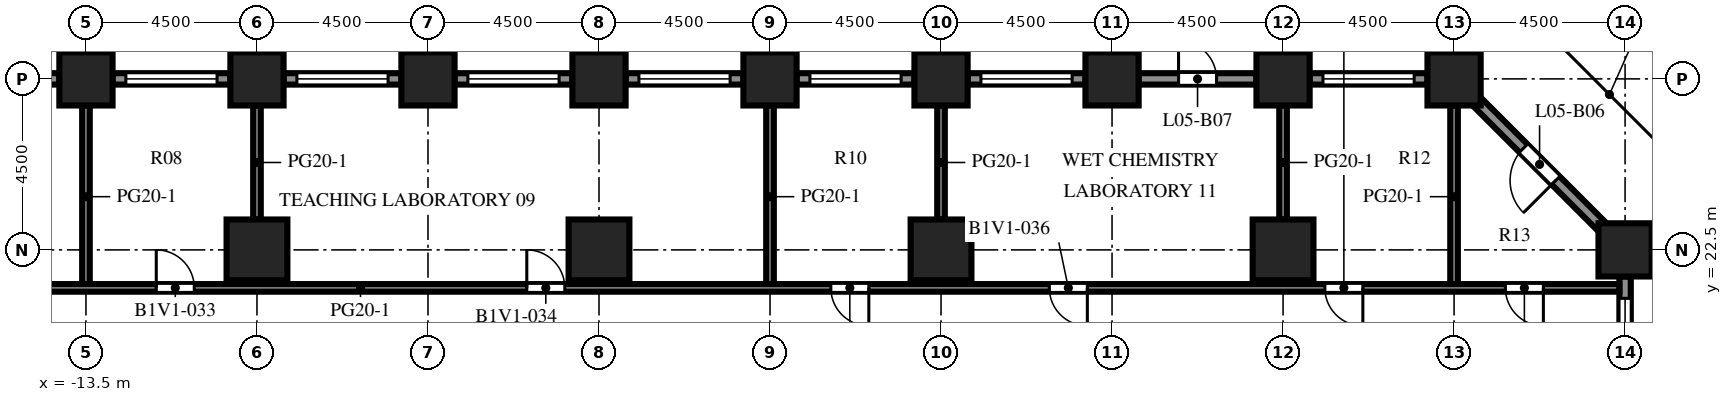
"""IFC4 building model, lengths in metres.
Left out: names, types, materials, properties, quantities, classifications, styles, units other than length and angle.
Written with IfcOpenShell. Run it as: python <this file> out.ifc"""

import sys

from ifc_helpers import new_model, si_unit, direction, frame, frame_2d, origin, origin_2d, place, context, subcontext, project, spatial, rectangle, extrude, element, fill, save


model = new_model("IFC4")
c1 = context("Model", 3, precision=1e-05, world=origin(), true_north=direction((0.0, 1.0)))
c2 = subcontext(c1, "Body", "Model", "MODEL_VIEW")
j1 = project(units=[si_unit("LENGTHUNIT", "METRE"), si_unit("PLANEANGLEUNIT", "RADIAN")], contexts=[c1])
p1 = place(None, origin())
s1 = spatial("IfcSite", under=j1, at=p1, CompositionType="ELEMENT")
p2 = place(p1, origin())
s2 = spatial("IfcBuilding", under=s1, at=p2, CompositionType="ELEMENT")
p3 = place(p2, frame((0.0, 0.0, 23.6)))
s3 = spatial("IfcBuildingStorey", under=s2, at=p3, CompositionType="ELEMENT", Elevation=23.6)
for number, where, z_axis, x_axis in (
    (1, (-13.5, 27.0, 0.0), (0.0, 0.0, 1.0), (1.0, 0.0, 0.0)),
    (2, (-9.0, 27.0, 0.0), (0.0, 0.0, 1.0), (1.0, 0.0, 0.0)),
    (3, (-4.5, 27.0, 0.0), (0.0, 0.0, 1.0), (1.0, 0.0, 0.0)),
    (4, (0.0, 27.0, 0.0), (0.0, 0.0, 1.0), (1.0, 0.0, 0.0)),
    (5, (4.5, 27.0, 0.0), (0.0, 0.0, 1.0), (1.0, 0.0, 0.0)),
    (6, (9.0, 27.0, 0.0), (0.0, 0.0, 1.0), (1.0, 0.0, 0.0)),
    (7, (13.5, 27.0, 0.0), (0.0, 0.0, 1.0), (1.0, 0.0, 0.0)),
    (8, (18.0, 27.0, 0.0), (0.0, 0.0, 1.0), (1.0, 0.0, 0.0)),
    (9, (22.5, 27.0, 0.0), (0.0, 0.0, 1.0), (1.0, 0.0, 0.0)),
    (10, (27.0, 22.5, 0.0), (0.0, 0.0, 1.0), (1.0, 0.0, 0.0)),
):
    element("IfcColumn", number, at=place(p3, frame(where, z_axis=z_axis, x_axis=x_axis)), inside=s3, PredefinedType="COLUMN", context=c2, shape_type="SweptSolid", body=[
        extrude(rectangle(XDim=1.4, YDim=1.4, at=origin_2d()), origin(), (0.0, 0.0, 1.0), 4.1),
    ])
for number, where, z_axis, x_axis in (
    (11, (-9.0, 22.5, 0.0), (0.0, 0.0, 1.0), (1.0, 0.0, 0.0)),
    (12, (0.0, 22.5, 0.0), (0.0, 0.0, 1.0), (1.0, 0.0, 0.0)),
    (13, (9.0, 22.5, 0.0), (0.0, 0.0, 1.0), (1.0, 0.0, 0.0)),
    (14, (18.0, 22.5, 0.0), (0.0, 0.0, 1.0), (1.0, 0.0, 0.0)),
):
    element("IfcColumn", number, at=place(p3, frame(where, z_axis=z_axis, x_axis=x_axis)), inside=s3, PredefinedType="COLUMN", context=c2, shape_type="SweptSolid", body=[
        extrude(rectangle(XDim=1.6, YDim=1.6, at=origin_2d()), origin(), (0.0, 0.0, 1.0), 4.1),
    ])
p4 = place(p3, frame((27.0, 21.8, 0.0), z_axis=(0.0, 0.0, 1.0), x_axis=(0.0, -1.0, 0.0)))
e15 = element("IfcWall", 15, at=p4, inside=s3, PredefinedType="SOLIDWALL", context=c2, shape_type="SweptSolid", body=[
    extrude(rectangle(XDim=3.1, YDim=0.3, at=frame_2d((1.55, 0.0))), origin(), (0.0, 0.0, 1.0), 2.75),
])
p5 = place(p4, frame((0.575, 0.0, 0.8)))
e16 = element("IfcOpeningElement", 16, at=p5, cuts=e15, PredefinedType="OPENING", context=c2, shape_type="SweptSolid", body=[
    extrude(rectangle(XDim=2.4, YDim=1.7, at=frame_2d((1.2, 0.85))), frame((0.0, 0.16, 0.0), z_axis=(0.0, -1.0, 0.0), x_axis=(1.0, 0.0, 0.0)), (0.0, 0.0, 1.0), 0.32),
])
p6 = place(p3, frame((23.094, 26.406, 0.0), z_axis=(0.0, 0.0, 1.0), x_axis=(0.707106781187, -0.707106781187, 0.0)))
e17 = element("IfcWall", 17, at=p6, inside=s3, PredefinedType="SOLIDWALL", context=c2, shape_type="SweptSolid", body=[
    extrude(rectangle(XDim=4.684, YDim=0.3, at=frame_2d((2.342, 0.0))), origin(), (0.0, 0.0, 1.0), 2.75),
])
p7 = place(p6, frame((1.742, 0.0, 0.0)))
e18 = element("IfcOpeningElement", 18, at=p7, cuts=e17, PredefinedType="OPENING", context=c2, shape_type="SweptSolid", body=[
    extrude(rectangle(XDim=1.2, YDim=2.2, at=frame_2d((0.6, 1.1))), frame((0.0, 0.16, 0.0), z_axis=(0.0, -1.0, 0.0), x_axis=(1.0, 0.0, 0.0)), (0.0, 0.0, 1.0), 0.32),
])
p8 = place(p3, frame((18.7, 27.0, 0.0), z_axis=(0.0, 0.0, 1.0), x_axis=(1.0, 0.0, 0.0)))
e19 = element("IfcWall", 19, at=p8, inside=s3, PredefinedType="SOLIDWALL", context=c2, shape_type="SweptSolid", body=[
    extrude(rectangle(XDim=3.1, YDim=0.3, at=frame_2d((1.55, 0.0))), origin(), (0.0, 0.0, 1.0), 2.75),
])
p9 = place(p8, frame((0.35, 0.0, 0.8)))
e20 = element("IfcOpeningElement", 20, at=p9, cuts=e19, PredefinedType="OPENING", context=c2, shape_type="SweptSolid", body=[
    extrude(rectangle(XDim=2.4, YDim=1.7, at=frame_2d((1.2, 0.85))), frame((0.0, 0.16, 0.0), z_axis=(0.0, -1.0, 0.0), x_axis=(1.0, 0.0, 0.0)), (0.0, 0.0, 1.0), 0.32),
])
p10 = place(p3, frame((14.2, 27.0, 0.0), z_axis=(0.0, 0.0, 1.0), x_axis=(1.0, 0.0, 0.0)))
e21 = element("IfcWall", 21, at=p10, inside=s3, PredefinedType="SOLIDWALL", context=c2, shape_type="SweptSolid", body=[
    extrude(rectangle(XDim=3.1, YDim=0.3, at=frame_2d((1.55, 0.0))), origin(), (0.0, 0.0, 1.0), 2.75),
])
p11 = place(p10, frame((1.05, 0.0, 0.0)))
e22 = element("IfcOpeningElement", 22, at=p11, cuts=e21, PredefinedType="OPENING", context=c2, shape_type="SweptSolid", body=[
    extrude(rectangle(XDim=1.0, YDim=2.2, at=frame_2d((0.5, 1.1))), frame((0.0, 0.16, 0.0), z_axis=(0.0, -1.0, 0.0), x_axis=(1.0, 0.0, 0.0)), (0.0, 0.0, 1.0), 0.32),
])
p12 = place(p3, frame((9.7, 27.0, 0.0), z_axis=(0.0, 0.0, 1.0), x_axis=(1.0, 0.0, 0.0)))
e23 = element("IfcWall", 23, at=p12, inside=s3, PredefinedType="SOLIDWALL", context=c2, shape_type="SweptSolid", body=[
    extrude(rectangle(XDim=3.1, YDim=0.3, at=frame_2d((1.55, 0.0))), origin(), (0.0, 0.0, 1.0), 2.75),
])
p13 = place(p12, frame((0.35, 0.0, 0.8)))
e24 = element("IfcOpeningElement", 24, at=p13, cuts=e23, PredefinedType="OPENING", context=c2, shape_type="SweptSolid", body=[
    extrude(rectangle(XDim=2.4, YDim=1.7, at=frame_2d((1.2, 0.85))), frame((0.0, 0.16, 0.0), z_axis=(0.0, -1.0, 0.0), x_axis=(1.0, 0.0, 0.0)), (0.0, 0.0, 1.0), 0.32),
])
p14 = place(p3, frame((5.2, 27.0, 0.0), z_axis=(0.0, 0.0, 1.0), x_axis=(1.0, 0.0, 0.0)))
e25 = element("IfcWall", 25, at=p14, inside=s3, PredefinedType="SOLIDWALL", context=c2, shape_type="SweptSolid", body=[
    extrude(rectangle(XDim=3.1, YDim=0.3, at=frame_2d((1.55, 0.0))), origin(), (0.0, 0.0, 1.0), 2.75),
])
p15 = place(p14, frame((0.35, 0.0, 0.8)))
e26 = element("IfcOpeningElement", 26, at=p15, cuts=e25, PredefinedType="OPENING", context=c2, shape_type="SweptSolid", body=[
    extrude(rectangle(XDim=2.4, YDim=1.7, at=frame_2d((1.2, 0.85))), frame((0.0, 0.16, 0.0), z_axis=(0.0, -1.0, 0.0), x_axis=(1.0, 0.0, 0.0)), (0.0, 0.0, 1.0), 0.32),
])
p16 = place(p3, frame((0.7, 27.0, 0.0), z_axis=(0.0, 0.0, 1.0), x_axis=(1.0, 0.0, 0.0)))
e27 = element("IfcWall", 27, at=p16, inside=s3, PredefinedType="SOLIDWALL", context=c2, shape_type="SweptSolid", body=[
    extrude(rectangle(XDim=3.1, YDim=0.3, at=frame_2d((1.55, 0.0))), origin(), (0.0, 0.0, 1.0), 2.75),
])
p17 = place(p16, frame((0.35, 0.0, 0.8)))
e28 = element("IfcOpeningElement", 28, at=p17, cuts=e27, PredefinedType="OPENING", context=c2, shape_type="SweptSolid", body=[
    extrude(rectangle(XDim=2.4, YDim=1.7, at=frame_2d((1.2, 0.85))), frame((0.0, 0.16, 0.0), z_axis=(0.0, -1.0, 0.0), x_axis=(1.0, 0.0, 0.0)), (0.0, 0.0, 1.0), 0.32),
])
p18 = place(p3, frame((-3.8, 27.0, 0.0), z_axis=(0.0, 0.0, 1.0), x_axis=(1.0, 0.0, 0.0)))
e29 = element("IfcWall", 29, at=p18, inside=s3, PredefinedType="SOLIDWALL", context=c2, shape_type="SweptSolid", body=[
    extrude(rectangle(XDim=3.1, YDim=0.3, at=frame_2d((1.55, 0.0))), origin(), (0.0, 0.0, 1.0), 2.75),
])
p19 = place(p18, frame((0.35, 0.0, 0.8)))
e30 = element("IfcOpeningElement", 30, at=p19, cuts=e29, PredefinedType="OPENING", context=c2, shape_type="SweptSolid", body=[
    extrude(rectangle(XDim=2.4, YDim=1.7, at=frame_2d((1.2, 0.85))), frame((0.0, 0.16, 0.0), z_axis=(0.0, -1.0, 0.0), x_axis=(1.0, 0.0, 0.0)), (0.0, 0.0, 1.0), 0.32),
])
p20 = place(p3, frame((-8.3, 27.0, 0.0), z_axis=(0.0, 0.0, 1.0), x_axis=(1.0, 0.0, 0.0)))
e31 = element("IfcWall", 31, at=p20, inside=s3, PredefinedType="SOLIDWALL", context=c2, shape_type="SweptSolid", body=[
    extrude(rectangle(XDim=3.1, YDim=0.3, at=frame_2d((1.55, 0.0))), origin(), (0.0, 0.0, 1.0), 2.75),
])
p21 = place(p20, frame((0.35, 0.0, 0.8)))
e32 = element("IfcOpeningElement", 32, at=p21, cuts=e31, PredefinedType="OPENING", context=c2, shape_type="SweptSolid", body=[
    extrude(rectangle(XDim=2.4, YDim=1.7, at=frame_2d((1.2, 0.85))), frame((0.0, 0.16, 0.0), z_axis=(0.0, -1.0, 0.0), x_axis=(1.0, 0.0, 0.0)), (0.0, 0.0, 1.0), 0.32),
])
p22 = place(p3, frame((-12.8, 27.0, 0.0), z_axis=(0.0, 0.0, 1.0), x_axis=(1.0, 0.0, 0.0)))
e33 = element("IfcWall", 33, at=p22, inside=s3, PredefinedType="SOLIDWALL", context=c2, shape_type="SweptSolid", body=[
    extrude(rectangle(XDim=3.1, YDim=0.3, at=frame_2d((1.55, 0.0))), origin(), (0.0, 0.0, 1.0), 2.75),
])
p23 = place(p22, frame((0.35, 0.0, 0.8)))
e34 = element("IfcOpeningElement", 34, at=p23, cuts=e33, PredefinedType="OPENING", context=c2, shape_type="SweptSolid", body=[
    extrude(rectangle(XDim=2.4, YDim=1.7, at=frame_2d((1.2, 0.85))), frame((0.0, 0.16, 0.0), z_axis=(0.0, -1.0, 0.0), x_axis=(1.0, 0.0, 0.0)), (0.0, 0.0, 1.0), 0.32),
])
p24 = place(p3, frame((-17.3, 27.0, 0.0), z_axis=(0.0, 0.0, 1.0), x_axis=(1.0, 0.0, 0.0)))
e35 = element("IfcWall", 35, at=p24, inside=s3, PredefinedType="SOLIDWALL", context=c2, shape_type="SweptSolid", body=[
    extrude(rectangle(XDim=3.1, YDim=0.3, at=frame_2d((1.55, 0.0))), origin(), (0.0, 0.0, 1.0), 2.75),
])
p25 = place(p24, frame((1.05, 0.0, 0.0)))
e36 = element("IfcOpeningElement", 36, at=p25, cuts=e35, PredefinedType="OPENING", context=c2, shape_type="SweptSolid", body=[
    extrude(rectangle(XDim=1.0, YDim=2.2, at=frame_2d((0.5, 1.1))), frame((0.0, 0.16, 0.0), z_axis=(0.0, -1.0, 0.0), x_axis=(1.0, 0.0, 0.0)), (0.0, 0.0, 1.0), 0.32),
])
p26 = place(p3, frame((-13.5, 21.5, 0.0), z_axis=(0.0, 0.0, 1.0), x_axis=(0.0, 1.0, 0.0)))
e37 = element("IfcWall", 37, at=p26, inside=s3, PredefinedType="PARTITIONING", context=c2, shape_type="SweptSolid", body=[
    extrude(rectangle(XDim=4.8, YDim=0.2, at=frame_2d((2.4, 0.0))), origin(), (0.0, 0.0, 1.0), 3.65),
])
p27 = place(p3, frame((-9.0, 23.3, 0.0), z_axis=(0.0, 0.0, 1.0), x_axis=(0.0, 1.0, 0.0)))
e38 = element("IfcWall", 38, at=p27, inside=s3, PredefinedType="PARTITIONING", context=c2, shape_type="SweptSolid", body=[
    extrude(rectangle(XDim=3.0, YDim=0.2, at=frame_2d((1.5, 0.0))), origin(), (0.0, 0.0, 1.0), 3.65),
])
p28 = place(p3, frame((4.5, 21.5, 0.0), z_axis=(0.0, 0.0, 1.0), x_axis=(0.0, 1.0, 0.0)))
e39 = element("IfcWall", 39, at=p28, inside=s3, PredefinedType="PARTITIONING", context=c2, shape_type="SweptSolid", body=[
    extrude(rectangle(XDim=4.8, YDim=0.2, at=frame_2d((2.4, 0.0))), origin(), (0.0, 0.0, 1.0), 3.65),
])
for number, where, z_axis, x_axis in (
    (40, (9.0, 23.3, 0.0), (0.0, 0.0, 1.0), (0.0, 1.0, 0.0)),
    (41, (18.0, 23.3, 0.0), (0.0, 0.0, 1.0), (0.0, 1.0, 0.0)),
):
    element("IfcWall", number, at=place(p3, frame(where, z_axis=z_axis, x_axis=x_axis)), inside=s3, PredefinedType="PARTITIONING", context=c2, shape_type="SweptSolid", body=[
        extrude(rectangle(XDim=3.0, YDim=0.2, at=frame_2d((1.5, 0.0))), origin(), (0.0, 0.0, 1.0), 3.65),
    ])
p29 = place(p3, frame((22.5, 21.5, 0.0), z_axis=(0.0, 0.0, 1.0), x_axis=(0.0, 1.0, 0.0)))
e42 = element("IfcWall", 42, at=p29, inside=s3, PredefinedType="PARTITIONING", context=c2, shape_type="SweptSolid", body=[
    extrude(rectangle(XDim=4.8, YDim=0.2, at=frame_2d((2.4, 0.0))), origin(), (0.0, 0.0, 1.0), 3.65),
])
p30 = place(p3, frame((-26.85, 21.5, 0.0), z_axis=(0.0, 0.0, 1.0), x_axis=(1.0, 0.0, 0.0)))
e43 = element("IfcWall", 43, at=p30, inside=s3, PredefinedType="PARTITIONING", context=c2, shape_type="SweptSolid", body=[
    extrude(rectangle(XDim=53.7, YDim=0.2, at=frame_2d((26.85, 0.0))), origin(), (0.0, 0.0, 1.0), 3.65),
])
p31 = place(p30, frame((0.95, 0.0, 0.0)))
e44 = element("IfcOpeningElement", 44, at=p31, cuts=e43, PredefinedType="OPENING", context=c2, shape_type="SweptSolid", body=[
    extrude(rectangle(XDim=1.0, YDim=2.1, at=frame_2d((0.5, 1.05))), frame((0.0, 0.11, 0.0), z_axis=(0.0, -1.0, 0.0), x_axis=(1.0, 0.0, 0.0)), (0.0, 0.0, 1.0), 0.22),
])
p32 = place(p30, frame((9.7, 0.0, 0.0)))
e45 = element("IfcOpeningElement", 45, at=p32, cuts=e43, PredefinedType="OPENING", context=c2, shape_type="SweptSolid", body=[
    extrude(rectangle(XDim=1.0, YDim=2.1, at=frame_2d((0.5, 1.05))), frame((0.0, 0.11, 0.0), z_axis=(0.0, -1.0, 0.0), x_axis=(1.0, 0.0, 0.0)), (0.0, 0.0, 1.0), 0.22),
])
p33 = place(p30, frame((15.2, 0.0, 0.0)))
e46 = element("IfcOpeningElement", 46, at=p33, cuts=e43, PredefinedType="OPENING", context=c2, shape_type="SweptSolid", body=[
    extrude(rectangle(XDim=1.0, YDim=2.1, at=frame_2d((0.5, 1.05))), frame((0.0, 0.11, 0.0), z_axis=(0.0, -1.0, 0.0), x_axis=(1.0, 0.0, 0.0)), (0.0, 0.0, 1.0), 0.22),
])
p34 = place(p30, frame((24.95, 0.0, 0.0)))
e47 = element("IfcOpeningElement", 47, at=p34, cuts=e43, PredefinedType="OPENING", context=c2, shape_type="SweptSolid", body=[
    extrude(rectangle(XDim=1.0, YDim=2.1, at=frame_2d((0.5, 1.05))), frame((0.0, 0.11, 0.0), z_axis=(0.0, -1.0, 0.0), x_axis=(1.0, 0.0, 0.0)), (0.0, 0.0, 1.0), 0.22),
])
p35 = place(p30, frame((32.95, 0.0, 0.0)))
e48 = element("IfcOpeningElement", 48, at=p35, cuts=e43, PredefinedType="OPENING", context=c2, shape_type="SweptSolid", body=[
    extrude(rectangle(XDim=1.0, YDim=2.1, at=frame_2d((0.5, 1.05))), frame((0.0, 0.11, 0.0), z_axis=(0.0, -1.0, 0.0), x_axis=(1.0, 0.0, 0.0)), (0.0, 0.0, 1.0), 0.22),
])
p36 = place(p30, frame((38.7, 0.0, 0.0)))
e49 = element("IfcOpeningElement", 49, at=p36, cuts=e43, PredefinedType="OPENING", context=c2, shape_type="SweptSolid", body=[
    extrude(rectangle(XDim=1.0, YDim=2.1, at=frame_2d((0.5, 1.05))), frame((0.0, 0.11, 0.0), z_axis=(0.0, -1.0, 0.0), x_axis=(1.0, 0.0, 0.0)), (0.0, 0.0, 1.0), 0.22),
])
p37 = place(p30, frame((45.95, 0.0, 0.0)))
e50 = element("IfcOpeningElement", 50, at=p37, cuts=e43, PredefinedType="OPENING", context=c2, shape_type="SweptSolid", body=[
    extrude(rectangle(XDim=1.0, YDim=2.1, at=frame_2d((0.5, 1.05))), frame((0.0, 0.11, 0.0), z_axis=(0.0, -1.0, 0.0), x_axis=(1.0, 0.0, 0.0)), (0.0, 0.0, 1.0), 0.22),
])
p38 = place(p30, frame((50.7, 0.0, 0.0)))
e51 = element("IfcOpeningElement", 51, at=p38, cuts=e43, PredefinedType="OPENING", context=c2, shape_type="SweptSolid", body=[
    extrude(rectangle(XDim=1.0, YDim=2.1, at=frame_2d((0.5, 1.05))), frame((0.0, 0.11, 0.0), z_axis=(0.0, -1.0, 0.0), x_axis=(1.0, 0.0, 0.0)), (0.0, 0.0, 1.0), 0.22),
])
p39 = place(p5, origin())
e52 = element("IfcWindow", 52, at=p39, inside=s3, PartitioningType="SINGLE_PANEL", PredefinedType="WINDOW", context=c2, shape_type="SweptSolid", body=[
    extrude(rectangle(XDim=2.4, YDim=1.7, at=frame_2d((1.2, 0.85))), frame((0.0, 0.03, 0.0), z_axis=(0.0, -1.0, 0.0), x_axis=(1.0, 0.0, 0.0)), (0.0, 0.0, 1.0), 0.06),
])
fill(e16, e52)
p40 = place(p7, origin())
e53 = element("IfcDoor", 53, at=p40, inside=s3, OperationType="SINGLE_SWING_RIGHT", PredefinedType="DOOR", context=c2, shape_type="SweptSolid", body=[
    extrude(rectangle(XDim=1.2, YDim=2.2, at=frame_2d((0.6, 1.1))), frame((0.0, 0.025, 0.0), z_axis=(0.0, -1.0, 0.0), x_axis=(1.0, 0.0, 0.0)), (0.0, 0.0, 1.0), 0.05),
])
fill(e18, e53)
p41 = place(p9, origin())
e54 = element("IfcWindow", 54, at=p41, inside=s3, PartitioningType="SINGLE_PANEL", PredefinedType="WINDOW", context=c2, shape_type="SweptSolid", body=[
    extrude(rectangle(XDim=2.4, YDim=1.7, at=frame_2d((1.2, 0.85))), frame((0.0, 0.03, 0.0), z_axis=(0.0, -1.0, 0.0), x_axis=(1.0, 0.0, 0.0)), (0.0, 0.0, 1.0), 0.06),
])
fill(e20, e54)
p42 = place(p11, origin())
e55 = element("IfcDoor", 55, at=p42, inside=s3, OperationType="SINGLE_SWING_LEFT", PredefinedType="DOOR", context=c2, shape_type="SweptSolid", body=[
    extrude(rectangle(XDim=1.0, YDim=2.2, at=frame_2d((0.5, 1.1))), frame((0.0, 0.025, 0.0), z_axis=(0.0, -1.0, 0.0), x_axis=(1.0, 0.0, 0.0)), (0.0, 0.0, 1.0), 0.05),
])
fill(e22, e55)
p43 = place(p13, origin())
e56 = element("IfcWindow", 56, at=p43, inside=s3, PartitioningType="SINGLE_PANEL", PredefinedType="WINDOW", context=c2, shape_type="SweptSolid", body=[
    extrude(rectangle(XDim=2.4, YDim=1.7, at=frame_2d((1.2, 0.85))), frame((0.0, 0.03, 0.0), z_axis=(0.0, -1.0, 0.0), x_axis=(1.0, 0.0, 0.0)), (0.0, 0.0, 1.0), 0.06),
])
fill(e24, e56)
p44 = place(p15, origin())
e57 = element("IfcWindow", 57, at=p44, inside=s3, PartitioningType="SINGLE_PANEL", PredefinedType="WINDOW", context=c2, shape_type="SweptSolid", body=[
    extrude(rectangle(XDim=2.4, YDim=1.7, at=frame_2d((1.2, 0.85))), frame((0.0, 0.03, 0.0), z_axis=(0.0, -1.0, 0.0), x_axis=(1.0, 0.0, 0.0)), (0.0, 0.0, 1.0), 0.06),
])
fill(e26, e57)
p45 = place(p17, origin())
e58 = element("IfcWindow", 58, at=p45, inside=s3, PartitioningType="SINGLE_PANEL", PredefinedType="WINDOW", context=c2, shape_type="SweptSolid", body=[
    extrude(rectangle(XDim=2.4, YDim=1.7, at=frame_2d((1.2, 0.85))), frame((0.0, 0.03, 0.0), z_axis=(0.0, -1.0, 0.0), x_axis=(1.0, 0.0, 0.0)), (0.0, 0.0, 1.0), 0.06),
])
fill(e28, e58)
p46 = place(p19, origin())
e59 = element("IfcWindow", 59, at=p46, inside=s3, PartitioningType="SINGLE_PANEL", PredefinedType="WINDOW", context=c2, shape_type="SweptSolid", body=[
    extrude(rectangle(XDim=2.4, YDim=1.7, at=frame_2d((1.2, 0.85))), frame((0.0, 0.03, 0.0), z_axis=(0.0, -1.0, 0.0), x_axis=(1.0, 0.0, 0.0)), (0.0, 0.0, 1.0), 0.06),
])
fill(e30, e59)
p47 = place(p21, origin())
e60 = element("IfcWindow", 60, at=p47, inside=s3, PartitioningType="SINGLE_PANEL", PredefinedType="WINDOW", context=c2, shape_type="SweptSolid", body=[
    extrude(rectangle(XDim=2.4, YDim=1.7, at=frame_2d((1.2, 0.85))), frame((0.0, 0.03, 0.0), z_axis=(0.0, -1.0, 0.0), x_axis=(1.0, 0.0, 0.0)), (0.0, 0.0, 1.0), 0.06),
])
fill(e32, e60)
p48 = place(p23, origin())
e61 = element("IfcWindow", 61, at=p48, inside=s3, PartitioningType="SINGLE_PANEL", PredefinedType="WINDOW", context=c2, shape_type="SweptSolid", body=[
    extrude(rectangle(XDim=2.4, YDim=1.7, at=frame_2d((1.2, 0.85))), frame((0.0, 0.03, 0.0), z_axis=(0.0, -1.0, 0.0), x_axis=(1.0, 0.0, 0.0)), (0.0, 0.0, 1.0), 0.06),
])
fill(e34, e61)
p49 = place(p33, origin())
e62 = element("IfcDoor", 62, at=p49, inside=s3, OperationType="SINGLE_SWING_LEFT", PredefinedType="DOOR", context=c2, shape_type="SweptSolid", body=[
    extrude(rectangle(XDim=1.0, YDim=2.1, at=frame_2d((0.5, 1.05))), frame((0.0, 0.025, 0.0), z_axis=(0.0, -1.0, 0.0), x_axis=(1.0, 0.0, 0.0)), (0.0, 0.0, 1.0), 0.05),
])
fill(e46, e62)
p50 = place(p34, origin())
e63 = element("IfcDoor", 63, at=p50, inside=s3, OperationType="SINGLE_SWING_LEFT", PredefinedType="DOOR", context=c2, shape_type="SweptSolid", body=[
    extrude(rectangle(XDim=1.0, YDim=2.1, at=frame_2d((0.5, 1.05))), frame((0.0, 0.025, 0.0), z_axis=(0.0, -1.0, 0.0), x_axis=(1.0, 0.0, 0.0)), (0.0, 0.0, 1.0), 0.05),
])
fill(e47, e63)
p51 = place(p35, origin())
e64 = element("IfcDoor", 64, at=p51, inside=s3, OperationType="SINGLE_SWING_RIGHT", PredefinedType="DOOR", context=c2, shape_type="SweptSolid", body=[
    extrude(rectangle(XDim=1.0, YDim=2.1, at=frame_2d((0.5, 1.05))), frame((0.0, 0.025, 0.0), z_axis=(0.0, -1.0, 0.0), x_axis=(1.0, 0.0, 0.0)), (0.0, 0.0, 1.0), 0.05),
])
fill(e48, e64)
p52 = place(p36, origin())
e65 = element("IfcDoor", 65, at=p52, inside=s3, OperationType="SINGLE_SWING_RIGHT", PredefinedType="DOOR", context=c2, shape_type="SweptSolid", body=[
    extrude(rectangle(XDim=1.0, YDim=2.1, at=frame_2d((0.5, 1.05))), frame((0.0, 0.025, 0.0), z_axis=(0.0, -1.0, 0.0), x_axis=(1.0, 0.0, 0.0)), (0.0, 0.0, 1.0), 0.05),
])
fill(e49, e65)
p53 = place(p37, origin())
e66 = element("IfcDoor", 66, at=p53, inside=s3, OperationType="SINGLE_SWING_RIGHT", PredefinedType="DOOR", context=c2, shape_type="SweptSolid", body=[
    extrude(rectangle(XDim=1.0, YDim=2.1, at=frame_2d((0.5, 1.05))), frame((0.0, 0.025, 0.0), z_axis=(0.0, -1.0, 0.0), x_axis=(1.0, 0.0, 0.0)), (0.0, 0.0, 1.0), 0.05),
])
fill(e50, e66)
p54 = place(p38, origin())
e67 = element("IfcDoor", 67, at=p54, inside=s3, OperationType="SINGLE_SWING_RIGHT", PredefinedType="DOOR", context=c2, shape_type="SweptSolid", body=[
    extrude(rectangle(XDim=1.0, YDim=2.1, at=frame_2d((0.5, 1.05))), frame((0.0, 0.025, 0.0), z_axis=(0.0, -1.0, 0.0), x_axis=(1.0, 0.0, 0.0)), (0.0, 0.0, 1.0), 0.05),
])
fill(e51, e67)
save(model, sys.argv[1])
